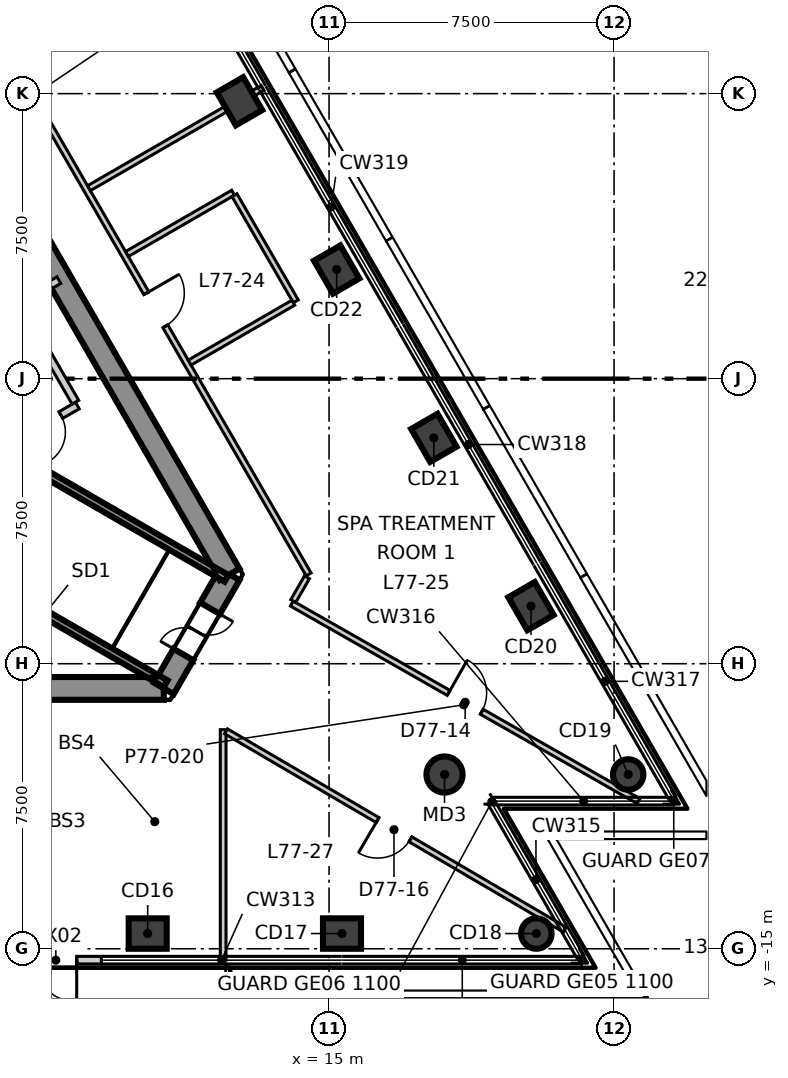
"""IFC4 building model, lengths in metres.
Left out: names, types, materials, properties, quantities, classifications, styles, units other than length and angle.
Written with IfcOpenShell. Run it as: python <this file> out.ifc"""

import sys

from ifc_helpers import new_model, si_unit, direction, frame, frame_2d, origin, origin_2d, place, context, subcontext, project, spatial, polyline, rectangle, circle, outline, extrude, element, fill, save


model = new_model("IFC4")
c1 = context("Model", 3, precision=1e-05, world=origin(), true_north=direction((0.0, 1.0)))
c2 = subcontext(c1, "Body", "Model", "MODEL_VIEW")
j1 = project(units=[si_unit("LENGTHUNIT", "METRE"), si_unit("PLANEANGLEUNIT", "RADIAN")], contexts=[c1])
p1 = place(None, origin())
s1 = spatial("IfcSite", under=j1, at=p1, CompositionType="ELEMENT")
p2 = place(p1, origin())
s2 = spatial("IfcBuilding", under=s1, at=p2, CompositionType="ELEMENT")
p3 = place(p2, frame((0.0, 0.0, 322.3)))
s3 = spatial("IfcBuildingStorey", under=s2, at=p3, CompositionType="ELEMENT", Elevation=322.3)
p4 = place(p3, frame((-10.652, -8.15, -0.3), z_axis=(0.0, 0.0, 1.0), x_axis=(1.0, 0.0, 0.0)))
e1 = element("IfcWall", 1, at=p4, inside=s3, PredefinedType="SHEAR", context=c2, shape_type="SweptSolid", body=[
    extrude(outline(polyline([(-0.173, -0.3), (1.795, -0.3), (3.763, -0.3), (5.731, -0.3), (7.7, -0.3), (9.668, -0.3), (11.636, -0.3), (13.604, -0.3), (15.573, -0.3), (17.541, -0.3), (19.509, -0.3), (21.477, -0.3), (21.131, 0.3), (19.226, 0.3), (17.321, 0.3), (15.415, 0.3), (13.51, 0.3), (11.605, 0.3), (9.699, 0.3), (7.794, 0.3), (5.889, 0.3), (3.984, 0.3), (2.078, 0.3), (0.173, 0.3), (-0.173, -0.3)])), origin(), (0.0, 0.0, 1.0), 5.35),
])
p5 = place(p4, frame((9.752, 0.0, 0.3)))
e2 = element("IfcOpeningElement", 2, at=p5, cuts=e1, PredefinedType="OPENING", context=c2, shape_type="SweptSolid", body=[
    extrude(rectangle(XDim=1.8, YDim=2.1, at=frame_2d((0.9, 1.05))), frame((0.0, 0.31, 0.0), z_axis=(0.0, -1.0, 0.0), x_axis=(1.0, 0.0, 0.0)), (0.0, 0.0, 1.0), 0.62),
])
p6 = place(p4, frame((4.026, 0.0, 0.3)))
e3 = element("IfcOpeningElement", 3, at=p6, cuts=e1, PredefinedType="OPENING", context=c2, shape_type="SweptSolid", body=[
    extrude(rectangle(XDim=0.9, YDim=2.1, at=frame_2d((0.45, 1.05))), frame((0.0, 0.31, 0.0), z_axis=(0.0, -1.0, 0.0), x_axis=(1.0, 0.0, 0.0)), (0.0, 0.0, 1.0), 0.62),
])
p7 = place(p3, frame((10.652, -8.15, -0.3), z_axis=(0.0, 0.0, 1.0), x_axis=(0.49997462182, 0.866040055388, 0.0)))
e4 = element("IfcWall", 4, at=p7, inside=s3, PredefinedType="SHEAR", context=c2, shape_type="SweptSolid", body=[
    extrude(outline(polyline([(-0.173, -0.3), (1.732, -0.301), (3.638, -0.301), (3.291, 0.3), (1.732, 0.3), (0.173, 0.3), (-0.173, -0.3)])), origin(), (0.0, 0.0, 1.0), 5.35),
])
p8 = place(p7, frame((1.032, 0.0, 0.3)))
e5 = element("IfcOpeningElement", 5, at=p8, cuts=e4, PredefinedType="OPENING", context=c2, shape_type="SweptSolid", body=[
    extrude(rectangle(XDim=1.4, YDim=2.1, at=frame_2d((0.7, 1.05))), frame((0.0, 0.31, 0.0), z_axis=(0.0, -1.0, 0.0), x_axis=(1.0, 0.0, 0.0)), (0.0, 0.0, 1.0), 0.621),
])
p9 = place(p3, frame((12.384, -5.15, -0.3), z_axis=(0.0, 0.0, 1.0), x_axis=(-0.500000539815, 0.866025092122, 0.0)))
e6 = element("IfcWall", 6, at=p9, inside=s3, PredefinedType="SHEAR", context=c2, shape_type="SweptSolid", body=[
    extrude(outline(polyline([(-0.173, -0.301), (1.795, -0.301), (3.763, -0.301), (5.731, -0.301), (7.7, -0.301), (9.668, -0.301), (11.636, -0.301), (13.604, -0.3), (15.573, -0.3), (17.541, -0.3), (19.509, -0.3), (21.477, -0.3), (21.131, 0.3), (19.226, 0.3), (17.321, 0.3), (15.415, 0.3), (13.51, 0.3), (11.605, 0.3), (9.699, 0.3), (7.794, 0.3), (5.889, 0.3), (3.984, 0.3), (2.078, 0.3), (0.173, 0.3), (-0.173, -0.301)])), origin(), (0.0, 0.0, 1.0), 5.35),
])
p10 = place(p9, frame((16.378, 0.0, 0.3)))
e7 = element("IfcOpeningElement", 7, at=p10, cuts=e6, PredefinedType="OPENING", context=c2, shape_type="SweptSolid", body=[
    extrude(rectangle(XDim=0.9, YDim=2.1, at=frame_2d((0.45, 1.05))), frame((0.0, 0.31, 0.0), z_axis=(0.0, -1.0, 0.0), x_axis=(1.0, 0.0, 0.0)), (0.0, 0.0, 1.0), 0.621),
])
for number, where, z_axis, x_axis in (
    (8, (10.228, -14.6, -0.3), (0.0, 0.0, 1.0), (1.0, 0.0, 0.0)),
    (9, (15.341, -14.6, -0.3), (0.0, 0.0, 1.0), (1.0, 0.0, 0.0)),
):
    element("IfcColumn", number, at=place(p3, frame(where, z_axis=z_axis, x_axis=x_axis)), inside=s3, PredefinedType="COLUMN", context=c2, shape_type="SweptSolid", body=[
        extrude(rectangle(XDim=1.0, YDim=0.8, at=origin_2d()), origin(), (0.0, 0.0, 1.0), 5.35),
    ])
for number, where, z_axis, x_axis in (
    (10, (20.455, -14.6, -0.3), (0.0, 0.0, 1.0), (1.0, 0.0, 0.0)),
    (11, (22.872, -10.415, -0.3), (0.0, 0.0, 1.0), (-0.5, 0.866, 0.0)),
):
    element("IfcColumn", number, at=place(p3, frame(where, z_axis=z_axis, x_axis=x_axis)), inside=s3, PredefinedType="COLUMN", context=c2, shape_type="SweptSolid", body=[
        extrude(circle(Radius=0.4, at=origin_2d()), origin(), (0.0, 0.0, 1.0), 5.35),
    ])
for number, where, z_axis, x_axis in (
    (12, (20.315, -5.986, -0.3), (0.0, 0.0, 1.0), (-0.5, 0.866, 0.0)),
    (13, (17.758, -1.557, -0.3), (0.0, 0.0, 1.0), (-0.5, 0.866, 0.0)),
    (14, (15.201, 2.871, -0.3), (0.0, 0.0, 1.0), (-0.5, 0.866, 0.0)),
    (15, (12.644, 7.3, -0.3), (0.0, 0.0, 1.0), (-0.5, 0.866, 0.0)),
):
    element("IfcColumn", number, at=place(p3, frame(where, z_axis=z_axis, x_axis=x_axis)), inside=s3, PredefinedType="COLUMN", context=c2, shape_type="SweptSolid", body=[
        extrude(rectangle(XDim=1.0, YDim=0.8, at=origin_2d()), origin(), (0.0, 0.0, 1.0), 5.35),
    ])
p11 = place(p3, frame((18.039, -10.415, -0.3), z_axis=(0.0, 0.0, 1.0), x_axis=(1.0, 0.0, 0.0)))
e16 = element("IfcColumn", 16, at=p11, inside=s3, PredefinedType="COLUMN", context=c2, shape_type="SweptSolid", body=[
    extrude(circle(Radius=0.475, at=origin_2d()), origin(), (0.0, 0.0, 1.0), 5.35),
])
p12 = place(p3, frame((6.61, -15.3, 0.0), z_axis=(0.0, 0.0, 1.0), x_axis=(1.0, 0.0, 0.0)))
e17 = element("IfcWall", 17, at=p12, inside=s3, PredefinedType="ELEMENTEDWALL", context=c2, shape_type="SweptSolid", body=[
    extrude(rectangle(XDim=2.4, YDim=0.2, at=frame_2d((1.2, 0.0))), origin(), (0.0, 0.0, 1.0), 5.05),
])
p13 = place(p12, frame((0.65, 0.0, 0.0)))
e18 = element("IfcOpeningElement", 18, at=p13, cuts=e17, PredefinedType="OPENING", context=c2, shape_type="SweptSolid", body=[
    extrude(rectangle(XDim=1.1, YDim=2.4, at=frame_2d((0.55, 1.2))), frame((0.0, 0.11, 0.0), z_axis=(0.0, -1.0, 0.0), x_axis=(1.0, 0.0, 0.0)), (0.0, 0.0, 1.0), 0.22),
])
p14 = place(p3, frame((2.771, 15.1, 0.0), z_axis=(0.0, 0.0, 1.0), x_axis=(0.500017691629, -0.866015189277, 0.0)))
e19 = element("IfcWall", 19, at=p14, inside=s3, PredefinedType="PARTITIONING", context=c2, shape_type="SweptSolid", body=[
    extrude(rectangle(XDim=23.383, YDim=0.15, at=frame_2d((11.691, 0.0))), origin(), (0.0, 0.0, 1.0), 5.05),
])
p15 = place(p14, frame((14.841, 0.0, 0.0)))
e20 = element("IfcOpeningElement", 20, at=p15, cuts=e19, PredefinedType="OPENING", context=c2, shape_type="SweptSolid", body=[
    extrude(rectangle(XDim=1.0, YDim=2.1, at=frame_2d((0.5, 1.05))), frame((0.0, 0.085, 0.0), z_axis=(0.0, -1.0, 0.0), x_axis=(1.0, 0.0, 0.0)), (0.0, 0.0, 1.0), 0.17),
])
p16 = place(p14, frame((5.246, 0.0, 0.0)))
e21 = element("IfcOpeningElement", 21, at=p16, cuts=e19, PredefinedType="OPENING", context=c2, shape_type="SweptSolid", body=[
    extrude(rectangle(XDim=1.2, YDim=2.1, at=frame_2d((0.6, 1.05))), frame((0.0, 0.085, 0.0), z_axis=(0.0, -1.0, 0.0), x_axis=(1.0, 0.0, 0.0)), (0.0, 0.0, 1.0), 0.17),
])
p17 = place(p3, frame((8.682, 5.012, 0.0), z_axis=(0.0, 0.0, 1.0), x_axis=(0.865981328726, 0.500076332472, 0.0)))
e22 = element("IfcWall", 22, at=p17, inside=s3, PredefinedType="PARTITIONING", context=c2, shape_type="SweptSolid", body=[
    extrude(rectangle(XDim=5.275, YDim=0.15, at=frame_2d((2.638, 0.0))), origin(), (0.0, 0.0, 1.0), 5.05),
])
p18 = place(p3, frame((9.682, 3.28, 0.0), z_axis=(0.0, 0.0, 1.0), x_axis=(0.86597507116, 0.50008716853, 0.0)))
e23 = element("IfcWall", 23, at=p18, inside=s3, PredefinedType="PARTITIONING", context=c2, shape_type="SweptSolid", body=[
    extrude(rectangle(XDim=3.226, YDim=0.15, at=frame_2d((1.613, 0.0))), origin(), (0.0, 0.0, 1.0), 5.05),
])
p19 = place(p3, frame((12.512, 4.828, 0.0), z_axis=(0.0, 0.0, 1.0), x_axis=(0.50011994908, -0.865956140074, 0.0)))
e24 = element("IfcWall", 24, at=p19, inside=s3, PredefinedType="PARTITIONING", context=c2, shape_type="SweptSolid", body=[
    extrude(rectangle(XDim=3.225, YDim=0.15, at=frame_2d((1.613, 0.0))), origin(), (0.0, 0.0, 1.0), 5.05),
])
p20 = place(p3, frame((11.332, 0.423, 0.0), z_axis=(0.0, 0.0, 1.0), x_axis=(0.866035871367, 0.499981869177, 0.0)))
e25 = element("IfcWall", 25, at=p20, inside=s3, PredefinedType="PARTITIONING", context=c2, shape_type="SweptSolid", body=[
    extrude(rectangle(XDim=3.15, YDim=0.15, at=frame_2d((1.575, 0.0))), origin(), (0.0, 0.0, 1.0), 5.05),
])
p21 = place(p3, frame((14.02, -5.917, 0.0), z_axis=(0.0, 0.0, 1.0), x_axis=(0.868887676317, -0.495009298846, 0.0)))
e26 = element("IfcWall", 26, at=p21, inside=s3, PredefinedType="PARTITIONING", context=c2, shape_type="SweptSolid", body=[
    extrude(rectangle(XDim=10.501, YDim=0.15, at=frame_2d((5.25, 0.0))), origin(), (0.0, 0.0, 1.0), 5.05),
])
p22 = place(p21, frame((4.75, 0.0, 0.0)))
e27 = element("IfcOpeningElement", 27, at=p22, cuts=e26, PredefinedType="OPENING", context=c2, shape_type="SweptSolid", body=[
    extrude(rectangle(XDim=1.0, YDim=2.1, at=frame_2d((0.5, 1.05))), frame((0.0, 0.085, 0.0), z_axis=(0.0, -1.0, 0.0), x_axis=(1.0, 0.0, 0.0)), (0.0, 0.0, 1.0), 0.17),
])
p23 = place(p3, frame((14.058, -5.852, 0.0), z_axis=(0.0, 0.0, 1.0), x_axis=(0.498826179569, 0.866702049482, 0.0)))
e28 = element("IfcWall", 28, at=p23, inside=s3, PredefinedType="PARTITIONING", context=c2, shape_type="SweptSolid", body=[
    extrude(rectangle(XDim=0.723, YDim=0.15, at=frame_2d((0.362, 0.0))), origin(), (0.0, 0.0, 1.0), 5.05),
])
p24 = place(p3, frame((12.214, -15.3, 0.0), z_axis=(0.0, 0.0, 1.0), x_axis=(0.0, 1.0, 0.0)))
e29 = element("IfcWall", 29, at=p24, inside=s3, PredefinedType="PARTITIONING", context=c2, shape_type="SweptSolid", body=[
    extrude(rectangle(XDim=6.065, YDim=0.15, at=frame_2d((3.032, 0.0))), origin(), (0.0, 0.0, 1.0), 5.05),
])
p25 = place(p3, frame((12.289, -9.279, 0.0), z_axis=(0.0, 0.0, 1.0), x_axis=(0.862979037459, -0.505239726175, 0.0)))
e30 = element("IfcWall", 30, at=p25, inside=s3, PredefinedType="PARTITIONING", context=c2, shape_type="SweptSolid", body=[
    extrude(rectangle(XDim=10.332, YDim=0.15, at=frame_2d((5.166, 0.0))), origin(), (0.0, 0.0, 1.0), 5.05),
])
p26 = place(p25, frame((4.622, 0.0, 0.0)))
e31 = element("IfcOpeningElement", 31, at=p26, cuts=e30, PredefinedType="OPENING", context=c2, shape_type="SweptSolid", body=[
    extrude(rectangle(XDim=1.0, YDim=2.1, at=frame_2d((0.5, 1.05))), frame((0.0, 0.085, 0.0), z_axis=(0.0, -1.0, 0.0), x_axis=(1.0, 0.0, 0.0)), (0.0, 0.0, 1.0), 0.17),
])
p27 = place(p3, frame((7.129, 2.153, 0.0), z_axis=(0.0, 0.0, 1.0), x_axis=(0.866083962871, 0.499898558967, 0.0)))
e32 = element("IfcWall", 32, at=p27, inside=s3, PredefinedType="SOLIDWALL", context=c2, shape_type="SweptSolid", body=[
    extrude(rectangle(XDim=0.88, YDim=0.2, at=frame_2d((0.44, 0.0))), origin(), (0.0, 0.0, 1.0), 5.05),
])
p28 = place(p3, frame((6.642, -1.708, 0.0), z_axis=(0.0, 0.0, 1.0), x_axis=(0.866043441391, 0.499968756647, 0.0)))
e33 = element("IfcWall", 33, at=p28, inside=s3, PredefinedType="SOLIDWALL", context=c2, shape_type="SweptSolid", body=[
    extrude(rectangle(XDim=2.002, YDim=0.2, at=frame_2d((1.001, 0.0))), origin(), (0.0, 0.0, 1.0), 5.05),
])
p29 = place(p28, frame((0.601, 0.0, 0.0)))
e34 = element("IfcOpeningElement", 34, at=p29, cuts=e33, PredefinedType="OPENING", context=c2, shape_type="SweptSolid", body=[
    extrude(rectangle(XDim=0.9, YDim=2.1, at=frame_2d((0.45, 1.05))), frame((0.0, 0.11, 0.0), z_axis=(0.0, -1.0, 0.0), x_axis=(1.0, 0.0, 0.0)), (0.0, 0.0, 1.0), 0.22),
])
p30 = place(p3, frame((6.826, 1.978, 0.0), z_axis=(0.0, 0.0, 1.0), x_axis=(0.499990139034, -0.866031096941, 0.0)))
e35 = element("IfcWall", 35, at=p30, inside=s3, PredefinedType="SOLIDWALL", context=c2, shape_type="SweptSolid", body=[
    extrude(rectangle(XDim=3.0, YDim=0.2, at=frame_2d((1.5, 0.0))), origin(), (0.0, 0.0, 1.0), 5.05),
])
p31 = place(p3, frame((4.929, -4.693, 0.0), z_axis=(0.0, 0.0, 1.0), x_axis=(0.866005022404, -0.500035299925, 0.0)))
e36 = element("IfcWall", 36, at=p31, inside=s3, PredefinedType="SOLIDWALL", context=c2, shape_type="SweptSolid", body=[
    extrude(rectangle(XDim=6.665, YDim=0.2, at=frame_2d((3.333, 0.0))), origin(), (0.0, 0.0, 1.0), 5.05),
])
p32 = place(p3, frame((6.529, -1.922, 0.0), z_axis=(0.0, 0.0, 1.0), x_axis=(0.866068467981, -0.499925403204, 0.0)))
e37 = element("IfcWall", 37, at=p32, inside=s3, PredefinedType="SOLIDWALL", context=c2, shape_type="SweptSolid", body=[
    extrude(rectangle(XDim=6.665, YDim=0.2, at=frame_2d((3.332, 0.0))), origin(), (0.0, 0.0, 1.0), 5.05),
])
p33 = place(p13, frame((1.1, 0.0, 0.0), z_axis=(0.0, 0.0, 1.0), x_axis=(-1.0, 0.0, 0.0)))
e38 = element("IfcDoor", 38, at=p33, inside=s3, OperationType="SINGLE_SWING_LEFT", PredefinedType="DOOR", context=c2, shape_type="SweptSolid", body=[
    extrude(rectangle(XDim=1.1, YDim=2.4, at=frame_2d((0.55, 1.2))), frame((0.0, 0.025, 0.0), z_axis=(0.0, -1.0, 0.0), x_axis=(1.0, 0.0, 0.0)), (0.0, 0.0, 1.0), 0.05),
])
fill(e18, e38)
p34 = place(p15, origin())
e39 = element("IfcDoor", 39, at=p34, inside=s3, OperationType="SINGLE_SWING_RIGHT", PredefinedType="DOOR", context=c2, shape_type="SweptSolid", body=[
    extrude(rectangle(XDim=1.0, YDim=2.1, at=frame_2d((0.5, 1.05))), frame((0.0, 0.025, 0.0), z_axis=(0.0, -1.0, 0.0), x_axis=(1.0, 0.0, 0.0)), (0.0, 0.0, 1.0), 0.05),
])
fill(e20, e39)
p35 = place(p22, origin())
e40 = element("IfcDoor", 40, at=p35, inside=s3, OperationType="SINGLE_SWING_RIGHT", PredefinedType="DOOR", context=c2, shape_type="SweptSolid", body=[
    extrude(rectangle(XDim=1.0, YDim=2.1, at=frame_2d((0.5, 1.05))), frame((0.0, 0.025, 0.0), z_axis=(0.0, -1.0, 0.0), x_axis=(1.0, 0.0, 0.0)), (0.0, 0.0, 1.0), 0.05),
])
fill(e27, e40)
p36 = place(p26, origin())
e41 = element("IfcDoor", 41, at=p36, inside=s3, OperationType="SINGLE_SWING_LEFT", PredefinedType="DOOR", context=c2, shape_type="SweptSolid", body=[
    extrude(rectangle(XDim=1.0, YDim=2.1, at=frame_2d((0.5, 1.05))), frame((0.0, 0.025, 0.0), z_axis=(0.0, -1.0, 0.0), x_axis=(1.0, 0.0, 0.0)), (0.0, 0.0, 1.0), 0.05),
])
fill(e31, e41)
p37 = place(p8, origin())
e42 = element("IfcDoor", 42, at=p37, inside=s3, OperationType="DOUBLE_DOOR_SINGLE_SWING", PredefinedType="DOOR", context=c2, shape_type="SweptSolid", body=[
    extrude(rectangle(XDim=1.4, YDim=2.1, at=frame_2d((0.7, 1.05))), frame((0.0, 0.025, 0.0), z_axis=(0.0, -1.0, 0.0), x_axis=(1.0, 0.0, 0.0)), (0.0, 0.0, 1.0), 0.05),
])
fill(e5, e42)
p38 = place(p29, origin())
e43 = element("IfcDoor", 43, at=p38, inside=s3, OperationType="SINGLE_SWING_LEFT", PredefinedType="DOOR", context=c2, shape_type="SweptSolid", body=[
    extrude(rectangle(XDim=0.9, YDim=2.1, at=frame_2d((0.45, 1.05))), frame((0.0, 0.025, 0.0), z_axis=(0.0, -1.0, 0.0), x_axis=(1.0, 0.0, 0.0)), (0.0, 0.0, 1.0), 0.05),
])
fill(e34, e43)
save(model, sys.argv[1])
